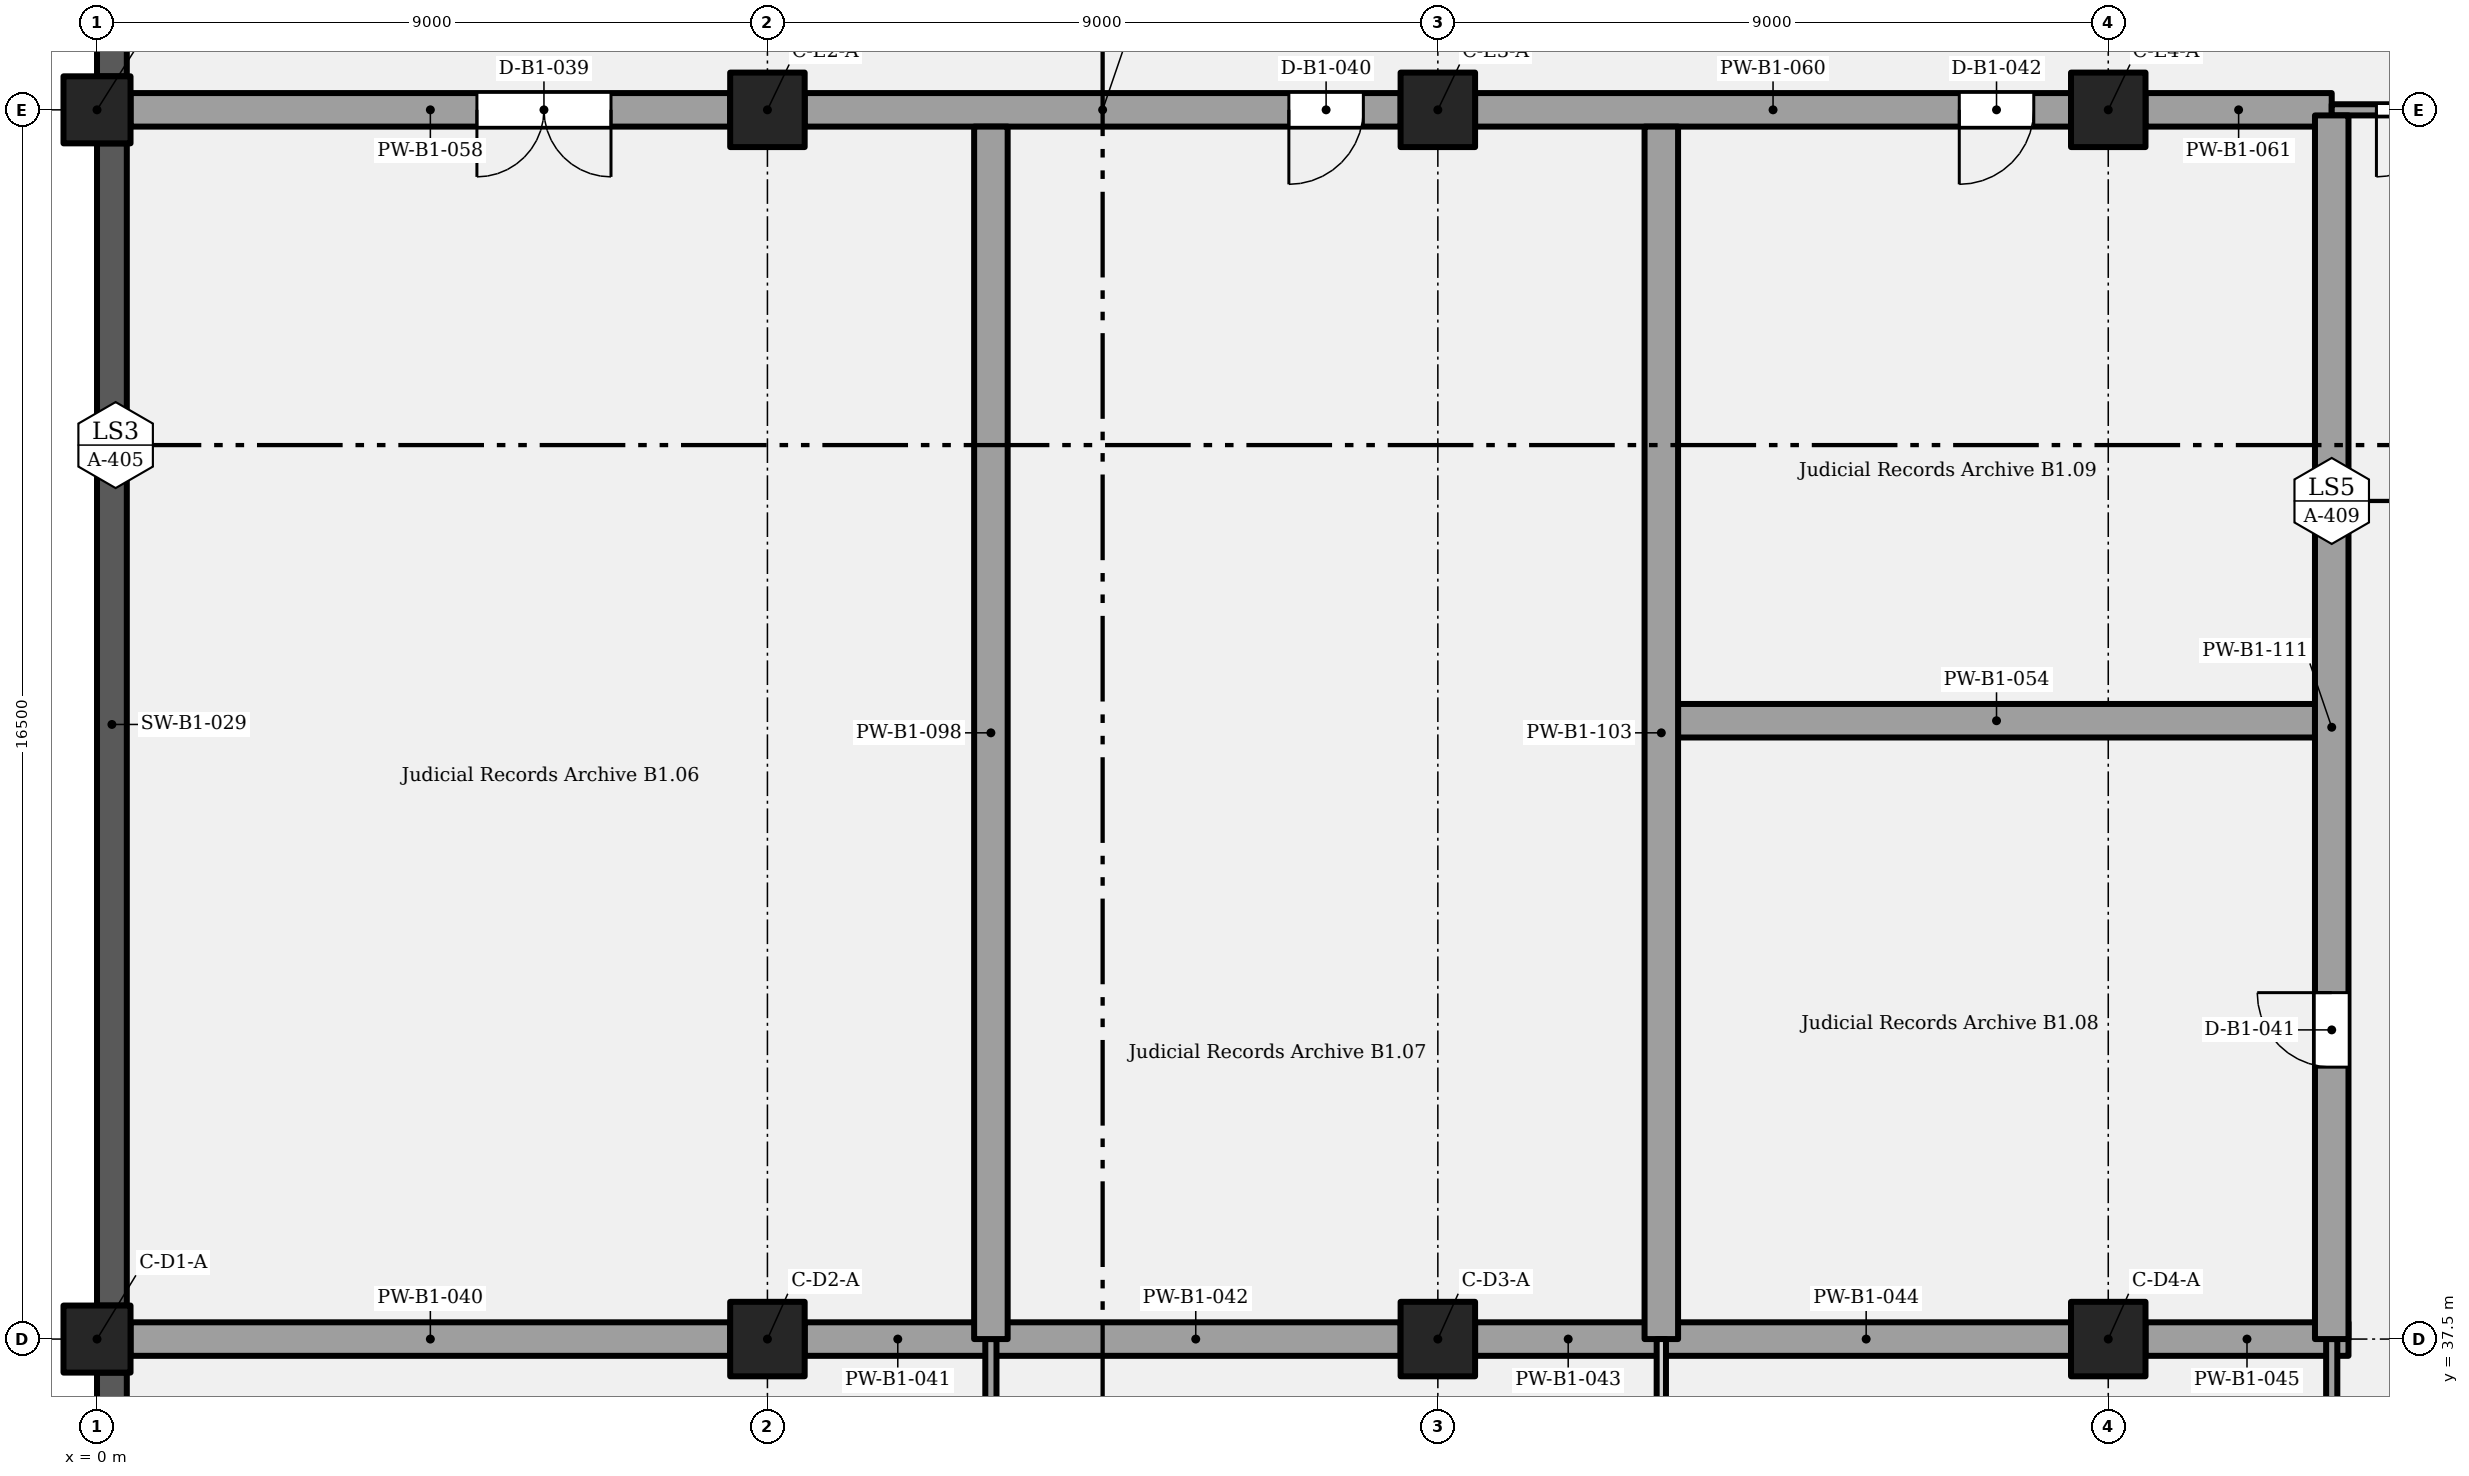
"""IFC4 building model, lengths in metres.
Left out: names, types, materials, properties, quantities, classifications, styles, units other than length and angle.
Written with IfcOpenShell. Run it as: python <this file> out.ifc"""

import sys

from ifc_helpers import new_model, si_unit, direction, frame, frame_2d, origin, origin_2d, place, context, subcontext, project, spatial, rectangle, extrude, element, fill, save


model = new_model("IFC4")
c1 = context("Model", 3, precision=1e-05, world=origin(), true_north=direction((0.0, 1.0)))
c2 = subcontext(c1, "Body", "Model", "MODEL_VIEW")
j1 = project(units=[si_unit("LENGTHUNIT", "METRE"), si_unit("PLANEANGLEUNIT", "RADIAN")], contexts=[c1])
p1 = place(None, origin())
s1 = spatial("IfcSite", under=j1, at=p1, CompositionType="ELEMENT")
p2 = place(p1, origin())
s2 = spatial("IfcBuilding", under=s1, at=p2, CompositionType="ELEMENT")
p3 = place(p2, frame((0.0, 0.0, -4.2)))
s3 = spatial("IfcBuildingStorey", under=s2, at=p3, CompositionType="ELEMENT", Elevation=-4.2)
p4 = place(p3, frame((0.0, 37.5, 0.0), z_axis=(0.0, 0.0, 1.0), x_axis=(1.0, 0.0, 0.0)))
e1 = element("IfcColumn", 1, at=p4, inside=s3, PredefinedType="COLUMN", context=c2, shape_type="SweptSolid", body=[
    extrude(rectangle(XDim=0.9, YDim=0.9, at=origin_2d()), origin(), (0.0, 0.0, 1.0), 4.2),
])
for number, where, z_axis, x_axis in (
    (2, (9.0, 37.5, 0.0), (0.0, 0.0, 1.0), (1.0, 0.0, 0.0)),
    (3, (18.0, 37.5, 0.0), (0.0, 0.0, 1.0), (1.0, 0.0, 0.0)),
    (4, (27.0, 37.5, 0.0), (0.0, 0.0, 1.0), (1.0, 0.0, 0.0)),
):
    element("IfcColumn", number, at=place(p3, frame(where, z_axis=z_axis, x_axis=x_axis)), inside=s3, PredefinedType="COLUMN", context=c2, shape_type="SweptSolid", body=[
        extrude(rectangle(XDim=1.0, YDim=1.0, at=origin_2d()), origin(), (0.0, 0.0, 1.0), 4.2),
    ])
p5 = place(p3, frame((0.0, 54.0, 0.0), z_axis=(0.0, 0.0, 1.0), x_axis=(1.0, 0.0, 0.0)))
e5 = element("IfcColumn", 5, at=p5, inside=s3, PredefinedType="COLUMN", context=c2, shape_type="SweptSolid", body=[
    extrude(rectangle(XDim=0.9, YDim=0.9, at=origin_2d()), origin(), (0.0, 0.0, 1.0), 4.2),
])
for number, where, z_axis, x_axis in (
    (6, (9.0, 54.0, 0.0), (0.0, 0.0, 1.0), (1.0, 0.0, 0.0)),
    (7, (18.0, 54.0, 0.0), (0.0, 0.0, 1.0), (1.0, 0.0, 0.0)),
    (8, (27.0, 54.0, 0.0), (0.0, 0.0, 1.0), (1.0, 0.0, 0.0)),
):
    element("IfcColumn", number, at=place(p3, frame(where, z_axis=z_axis, x_axis=x_axis)), inside=s3, PredefinedType="COLUMN", context=c2, shape_type="SweptSolid", body=[
        extrude(rectangle(XDim=1.0, YDim=1.0, at=origin_2d()), origin(), (0.0, 0.0, 1.0), 4.2),
    ])
p6 = place(p3, frame((0.2, 28.95, 0.0), z_axis=(0.0, 0.0, 1.0), x_axis=(0.0, 1.0, 0.0)))
e9 = element("IfcWall", 9, at=p6, inside=s3, PredefinedType="SOLIDWALL", context=c2, shape_type="SweptSolid", body=[
    extrude(rectangle(XDim=8.1, YDim=0.4, at=frame_2d((4.05, 0.0))), origin(), (0.0, 0.0, 1.0), 3.9),
])
p7 = place(p3, frame((0.2, 37.95, 0.0), z_axis=(0.0, 0.0, 1.0), x_axis=(0.0, 1.0, 0.0)))
e10 = element("IfcWall", 10, at=p7, inside=s3, PredefinedType="SOLIDWALL", context=c2, shape_type="SweptSolid", body=[
    extrude(rectangle(XDim=15.6, YDim=0.4, at=frame_2d((7.8, 0.0))), origin(), (0.0, 0.0, 1.0), 3.9),
])
p8 = place(p3, frame((0.2, 54.45, 0.0), z_axis=(0.0, 0.0, 1.0), x_axis=(0.0, 1.0, 0.0)))
e11 = element("IfcWall", 11, at=p8, inside=s3, PredefinedType="SOLIDWALL", context=c2, shape_type="SweptSolid", body=[
    extrude(rectangle(XDim=11.1, YDim=0.4, at=frame_2d((5.55, 0.0))), origin(), (0.0, 0.0, 1.0), 3.9),
])
p9 = place(p3, frame((0.45, 37.5, 0.0), z_axis=(0.0, 0.0, 1.0), x_axis=(1.0, 0.0, 0.0)))
e12 = element("IfcWall", 12, at=p9, inside=s3, PredefinedType="PARTITIONING", context=c2, shape_type="SweptSolid", body=[
    extrude(rectangle(XDim=8.05, YDim=0.45, at=frame_2d((4.025, 0.0))), origin(), (0.0, 0.0, 1.0), 3.15),
])
p10 = place(p3, frame((9.5, 37.5, 0.0), z_axis=(0.0, 0.0, 1.0), x_axis=(1.0, 0.0, 0.0)))
e13 = element("IfcWall", 13, at=p10, inside=s3, PredefinedType="PARTITIONING", context=c2, shape_type="SweptSolid", body=[
    extrude(rectangle(XDim=2.5, YDim=0.45, at=frame_2d((1.25, 0.0))), origin(), (0.0, 0.0, 1.0), 3.15),
])
p11 = place(p3, frame((12.0, 37.5, 0.0), z_axis=(0.0, 0.0, 1.0), x_axis=(1.0, 0.0, 0.0)))
e14 = element("IfcWall", 14, at=p11, inside=s3, PredefinedType="PARTITIONING", context=c2, shape_type="SweptSolid", body=[
    extrude(rectangle(XDim=5.5, YDim=0.45, at=frame_2d((2.75, 0.0))), origin(), (0.0, 0.0, 1.0), 3.15),
])
p12 = place(p3, frame((18.5, 37.5, 0.0), z_axis=(0.0, 0.0, 1.0), x_axis=(1.0, 0.0, 0.0)))
e15 = element("IfcWall", 15, at=p12, inside=s3, PredefinedType="PARTITIONING", context=c2, shape_type="SweptSolid", body=[
    extrude(rectangle(XDim=2.5, YDim=0.45, at=frame_2d((1.25, 0.0))), origin(), (0.0, 0.0, 1.0), 3.15),
])
p13 = place(p3, frame((21.0, 37.5, 0.0), z_axis=(0.0, 0.0, 1.0), x_axis=(1.0, 0.0, 0.0)))
e16 = element("IfcWall", 16, at=p13, inside=s3, PredefinedType="PARTITIONING", context=c2, shape_type="SweptSolid", body=[
    extrude(rectangle(XDim=5.5, YDim=0.45, at=frame_2d((2.75, 0.0))), origin(), (0.0, 0.0, 1.0), 3.15),
])
p14 = place(p3, frame((27.5, 37.5, 0.0), z_axis=(0.0, 0.0, 1.0), x_axis=(1.0, 0.0, 0.0)))
e17 = element("IfcWall", 17, at=p14, inside=s3, PredefinedType="PARTITIONING", context=c2, shape_type="SweptSolid", body=[
    extrude(rectangle(XDim=2.725, YDim=0.45, at=frame_2d((1.363, 0.0))), origin(), (0.0, 0.0, 1.0), 3.15),
])
p15 = place(p3, frame((21.225, 45.8, 0.0), z_axis=(0.0, 0.0, 1.0), x_axis=(1.0, 0.0, 0.0)))
e18 = element("IfcWall", 18, at=p15, inside=s3, PredefinedType="PARTITIONING", context=c2, shape_type="SweptSolid", body=[
    extrude(rectangle(XDim=8.55, YDim=0.45, at=frame_2d((4.275, 0.0))), origin(), (0.0, 0.0, 1.0), 3.9),
])
p16 = place(p3, frame((0.45, 54.0, 0.0), z_axis=(0.0, 0.0, 1.0), x_axis=(1.0, 0.0, 0.0)))
e19 = element("IfcWall", 19, at=p16, inside=s3, PredefinedType="PARTITIONING", context=c2, shape_type="SweptSolid", body=[
    extrude(rectangle(XDim=8.05, YDim=0.45, at=frame_2d((4.025, 0.0))), origin(), (0.0, 0.0, 1.0), 3.15),
])
p17 = place(p16, frame((6.45, 0.0, 0.0), z_axis=(0.0, 0.0, 1.0), x_axis=(-1.0, 0.0, 0.0)))
e20 = element("IfcOpeningElement", 20, at=p17, cuts=e19, PredefinedType="OPENING", context=c2, shape_type="SweptSolid", body=[
    extrude(rectangle(XDim=1.8, YDim=2.4, at=frame_2d((0.9, 1.2))), frame((0.0, 0.235, 0.0), z_axis=(0.0, -1.0, 0.0), x_axis=(1.0, 0.0, 0.0)), (0.0, 0.0, 1.0), 0.47),
])
p18 = place(p3, frame((9.5, 54.0, 0.0), z_axis=(0.0, 0.0, 1.0), x_axis=(1.0, 0.0, 0.0)))
e21 = element("IfcWall", 21, at=p18, inside=s3, PredefinedType="PARTITIONING", context=c2, shape_type="SweptSolid", body=[
    extrude(rectangle(XDim=8.0, YDim=0.45, at=frame_2d((4.0, 0.0))), origin(), (0.0, 0.0, 1.0), 3.15),
])
p19 = place(p18, frame((7.5, 0.0, 0.0), z_axis=(0.0, 0.0, 1.0), x_axis=(-1.0, 0.0, 0.0)))
e22 = element("IfcOpeningElement", 22, at=p19, cuts=e21, PredefinedType="OPENING", context=c2, shape_type="SweptSolid", body=[
    extrude(rectangle(XDim=1.0, YDim=2.1, at=frame_2d((0.5, 1.05))), frame((0.0, 0.235, 0.0), z_axis=(0.0, -1.0, 0.0), x_axis=(1.0, 0.0, 0.0)), (0.0, 0.0, 1.0), 0.47),
])
p20 = place(p3, frame((18.5, 54.0, 0.0), z_axis=(0.0, 0.0, 1.0), x_axis=(1.0, 0.0, 0.0)))
e23 = element("IfcWall", 23, at=p20, inside=s3, PredefinedType="PARTITIONING", context=c2, shape_type="SweptSolid", body=[
    extrude(rectangle(XDim=8.0, YDim=0.45, at=frame_2d((4.0, 0.0))), origin(), (0.0, 0.0, 1.0), 3.15),
])
p21 = place(p20, frame((7.5, 0.0, 0.0), z_axis=(0.0, 0.0, 1.0), x_axis=(-1.0, 0.0, 0.0)))
e24 = element("IfcOpeningElement", 24, at=p21, cuts=e23, PredefinedType="OPENING", context=c2, shape_type="SweptSolid", body=[
    extrude(rectangle(XDim=1.0, YDim=2.1, at=frame_2d((0.5, 1.05))), frame((0.0, 0.235, 0.0), z_axis=(0.0, -1.0, 0.0), x_axis=(1.0, 0.0, 0.0)), (0.0, 0.0, 1.0), 0.47),
])
p22 = place(p3, frame((27.5, 54.0, 0.0), z_axis=(0.0, 0.0, 1.0), x_axis=(1.0, 0.0, 0.0)))
e25 = element("IfcWall", 25, at=p22, inside=s3, PredefinedType="PARTITIONING", context=c2, shape_type="SweptSolid", body=[
    extrude(rectangle(XDim=2.5, YDim=0.45, at=frame_2d((1.25, 0.0))), origin(), (0.0, 0.0, 1.0), 3.15),
])
p23 = place(p3, frame((30.0, 54.0, 0.0), z_axis=(0.0, 0.0, 1.0), x_axis=(1.0, 0.0, 0.0)))
e26 = element("IfcWall", 26, at=p23, inside=s3, PredefinedType="PARTITIONING", context=c2, shape_type="SweptSolid", body=[
    extrude(rectangle(XDim=3.0, YDim=0.15, at=frame_2d((1.5, 0.0))), origin(), (0.0, 0.0, 1.0), 3.15),
])
p24 = place(p23, frame((2.4, 0.0, 0.0), z_axis=(0.0, 0.0, 1.0), x_axis=(-1.0, 0.0, 0.0)))
e27 = element("IfcOpeningElement", 27, at=p24, cuts=e26, PredefinedType="OPENING", context=c2, shape_type="SweptSolid", body=[
    extrude(rectangle(XDim=1.8, YDim=2.1, at=frame_2d((0.9, 1.05))), frame((0.0, 0.085, 0.0), z_axis=(0.0, -1.0, 0.0), x_axis=(1.0, 0.0, 0.0)), (0.0, 0.0, 1.0), 0.17),
])
p25 = place(p3, frame((12.0, 31.575, 0.0), z_axis=(0.0, 0.0, 1.0), x_axis=(0.0, 1.0, 0.0)))
e28 = element("IfcWall", 28, at=p25, inside=s3, PredefinedType="PARTITIONING", context=c2, shape_type="SweptSolid", body=[
    extrude(rectangle(XDim=5.925, YDim=0.15, at=frame_2d((2.962, 0.0))), origin(), (0.0, 0.0, 1.0), 3.9),
])
p26 = place(p3, frame((12.0, 37.5, 0.0), z_axis=(0.0, 0.0, 1.0), x_axis=(0.0, 1.0, 0.0)))
e29 = element("IfcWall", 29, at=p26, inside=s3, PredefinedType="PARTITIONING", context=c2, shape_type="SweptSolid", body=[
    extrude(rectangle(XDim=16.275, YDim=0.45, at=frame_2d((8.137, 0.0))), origin(), (0.0, 0.0, 1.0), 3.9),
])
p27 = place(p3, frame((21.0, 31.575, 0.0), z_axis=(0.0, 0.0, 1.0), x_axis=(0.0, 1.0, 0.0)))
e30 = element("IfcWall", 30, at=p27, inside=s3, PredefinedType="PARTITIONING", context=c2, shape_type="SweptSolid", body=[
    extrude(rectangle(XDim=5.925, YDim=0.125, at=frame_2d((2.962, 0.0))), origin(), (0.0, 0.0, 1.0), 3.9),
])
p28 = place(p3, frame((21.0, 37.5, 0.0), z_axis=(0.0, 0.0, 1.0), x_axis=(0.0, 1.0, 0.0)))
e31 = element("IfcWall", 31, at=p28, inside=s3, PredefinedType="PARTITIONING", context=c2, shape_type="SweptSolid", body=[
    extrude(rectangle(XDim=16.275, YDim=0.45, at=frame_2d((8.137, 0.0))), origin(), (0.0, 0.0, 1.0), 3.9),
])
p29 = place(p3, frame((30.0, 12.075, 0.0), z_axis=(0.0, 0.0, 1.0), x_axis=(0.0, 1.0, 0.0)))
e32 = element("IfcWall", 32, at=p29, inside=s3, PredefinedType="PARTITIONING", context=c2, shape_type="SweptSolid", body=[
    extrude(rectangle(XDim=25.425, YDim=0.15, at=frame_2d((12.712, 0.0))), origin(), (0.0, 0.0, 1.0), 3.9),
])
p30 = place(p29, frame((18.825, 0.0, 0.0), z_axis=(0.0, 0.0, 1.0), x_axis=(-1.0, 0.0, 0.0)))
e33 = element("IfcOpeningElement", 33, at=p30, cuts=e32, PredefinedType="OPENING", context=c2, shape_type="SweptSolid", body=[
    extrude(rectangle(XDim=1.8, YDim=2.1, at=frame_2d((0.9, 1.05))), frame((0.0, 0.085, 0.0), z_axis=(0.0, -1.0, 0.0), x_axis=(1.0, 0.0, 0.0)), (0.0, 0.0, 1.0), 0.17),
])
p31 = place(p29, frame((11.775, 0.0, 0.0)))
e34 = element("IfcOpeningElement", 34, at=p31, cuts=e32, PredefinedType="OPENING", context=c2, shape_type="SweptSolid", body=[
    extrude(rectangle(XDim=1.0, YDim=2.1, at=frame_2d((0.5, 1.05))), frame((0.0, 0.085, 0.0), z_axis=(0.0, -1.0, 0.0), x_axis=(1.0, 0.0, 0.0)), (0.0, 0.0, 1.0), 0.17),
])
p32 = place(p3, frame((30.0, 37.5, 0.0), z_axis=(0.0, 0.0, 1.0), x_axis=(0.0, 1.0, 0.0)))
e35 = element("IfcWall", 35, at=p32, inside=s3, PredefinedType="PARTITIONING", context=c2, shape_type="SweptSolid", body=[
    extrude(rectangle(XDim=16.425, YDim=0.45, at=frame_2d((8.212, 0.0))), origin(), (0.0, 0.0, 1.0), 3.9),
])
p33 = place(p32, frame((3.65, 0.0, 0.0)))
e36 = element("IfcOpeningElement", 36, at=p33, cuts=e35, PredefinedType="OPENING", context=c2, shape_type="SweptSolid", body=[
    extrude(rectangle(XDim=1.0, YDim=2.1, at=frame_2d((0.5, 1.05))), frame((0.0, 0.235, 0.0), z_axis=(0.0, -1.0, 0.0), x_axis=(1.0, 0.0, 0.0)), (0.0, 0.0, 1.0), 0.47),
])
p34 = place(p24, origin())
e37 = element("IfcDoor", 37, at=p34, inside=s3, OperationType="DOUBLE_DOOR_SINGLE_SWING", PredefinedType="DOOR", context=c2, shape_type="SweptSolid", body=[
    extrude(rectangle(XDim=1.8, YDim=2.1, at=frame_2d((0.9, 1.05))), frame((0.0, 0.025, 0.0), z_axis=(0.0, -1.0, 0.0), x_axis=(1.0, 0.0, 0.0)), (0.0, 0.0, 1.0), 0.05),
])
fill(e27, e37)
p35 = place(p17, origin())
e38 = element("IfcDoor", 38, at=p35, inside=s3, OperationType="DOUBLE_DOOR_SINGLE_SWING", PredefinedType="DOOR", context=c2, shape_type="SweptSolid", body=[
    extrude(rectangle(XDim=1.8, YDim=2.4, at=frame_2d((0.9, 1.2))), frame((0.0, 0.025, 0.0), z_axis=(0.0, -1.0, 0.0), x_axis=(1.0, 0.0, 0.0)), (0.0, 0.0, 1.0), 0.05),
])
fill(e20, e38)
p36 = place(p19, origin())
e39 = element("IfcDoor", 39, at=p36, inside=s3, OperationType="SINGLE_SWING_RIGHT", PredefinedType="DOOR", context=c2, shape_type="SweptSolid", body=[
    extrude(rectangle(XDim=1.0, YDim=2.1, at=frame_2d((0.5, 1.05))), frame((0.0, 0.025, 0.0), z_axis=(0.0, -1.0, 0.0), x_axis=(1.0, 0.0, 0.0)), (0.0, 0.0, 1.0), 0.05),
])
fill(e22, e39)
p37 = place(p33, origin())
e40 = element("IfcDoor", 40, at=p37, inside=s3, OperationType="SINGLE_SWING_RIGHT", PredefinedType="DOOR", context=c2, shape_type="SweptSolid", body=[
    extrude(rectangle(XDim=1.0, YDim=2.1, at=frame_2d((0.5, 1.05))), frame((0.0, 0.025, 0.0), z_axis=(0.0, -1.0, 0.0), x_axis=(1.0, 0.0, 0.0)), (0.0, 0.0, 1.0), 0.05),
])
fill(e36, e40)
p38 = place(p21, origin())
e41 = element("IfcDoor", 41, at=p38, inside=s3, OperationType="SINGLE_SWING_RIGHT", PredefinedType="DOOR", context=c2, shape_type="SweptSolid", body=[
    extrude(rectangle(XDim=1.0, YDim=2.1, at=frame_2d((0.5, 1.05))), frame((0.0, 0.025, 0.0), z_axis=(0.0, -1.0, 0.0), x_axis=(1.0, 0.0, 0.0)), (0.0, 0.0, 1.0), 0.05),
])
fill(e24, e41)
save(model, sys.argv[1])
